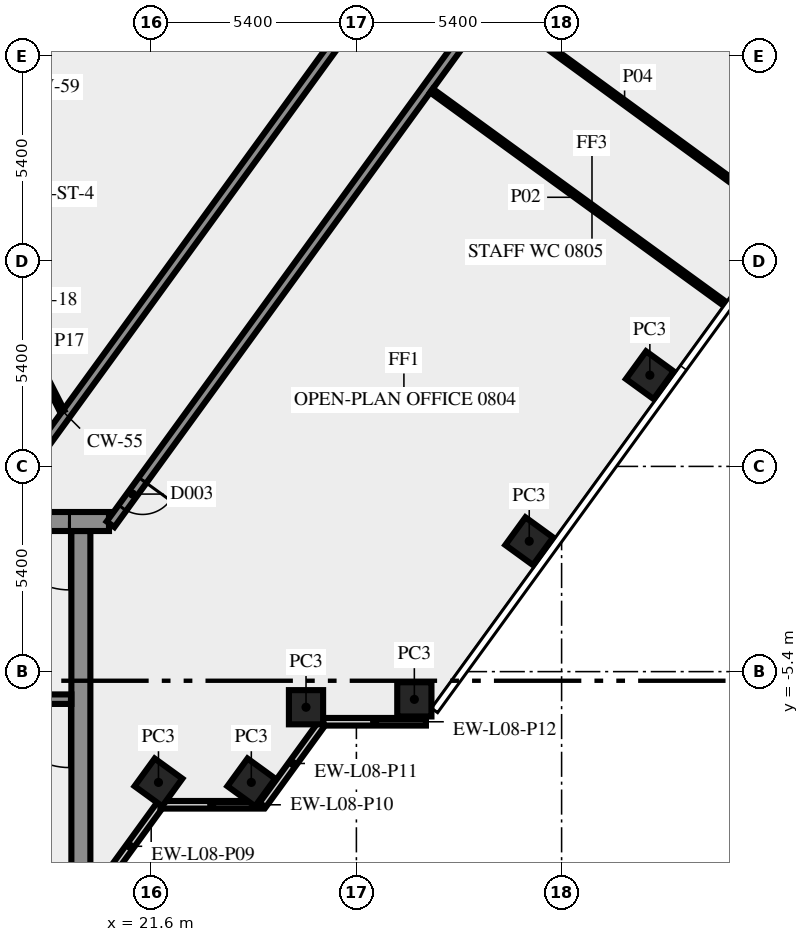
"""IFC4 building model, lengths in metres.
Left out: names, types, materials, properties, quantities, classifications, styles, units other than length and angle.
Written with IfcOpenShell. Run it as: python <this file> out.ifc"""

import sys

from ifc_helpers import new_model, si_unit, direction, frame, frame_2d, origin, origin_2d, place, context, subcontext, project, spatial, rectangle, extrude, element, fill, save


model = new_model("IFC4")
c1 = context("Model", 3, precision=1e-05, world=origin(), true_north=direction((0.0, 1.0)))
c2 = subcontext(c1, "Body", "Model", "MODEL_VIEW")
j1 = project(units=[si_unit("LENGTHUNIT", "METRE"), si_unit("PLANEANGLEUNIT", "RADIAN")], contexts=[c1])
p1 = place(None, origin())
s1 = spatial("IfcSite", under=j1, at=p1, CompositionType="ELEMENT")
p2 = place(p1, origin())
s2 = spatial("IfcBuilding", under=s1, at=p2, CompositionType="ELEMENT")
p3 = place(p2, frame((0.0, 0.0, 39.0)))
s3 = spatial("IfcBuildingStorey", under=s2, at=p3, CompositionType="ELEMENT", Elevation=39.0)
for number, where, z_axis, x_axis in (
    (1, (21.792, -8.315, 0.0), (0.0, 0.0, 1.0), (0.588, 0.809, 0.0)),
    (2, (24.235, -8.315, 0.0), (0.0, 0.0, 1.0), (0.588, 0.809, 0.0)),
    (3, (25.674, -6.337, 0.0), (0.0, 0.0, 1.0), (1.0, 0.0, 0.0)),
    (4, (28.525, -6.13, 0.0), (0.0, 0.0, 1.0), (1.0, 0.0, 0.0)),
    (5, (31.548, -1.969, 0.0), (0.0, 0.0, 1.0), (0.588, 0.809, 0.0)),
    (6, (34.722, 2.4, 0.0), (0.0, 0.0, 1.0), (0.588, 0.809, 0.0)),
):
    element("IfcColumn", number, at=place(p3, frame(where, z_axis=z_axis, x_axis=x_axis)), inside=s3, PredefinedType="COLUMN", context=c2, shape_type="SweptSolid", body=[
        extrude(rectangle(XDim=0.9, YDim=0.9, at=origin_2d()), origin(), (0.0, 0.0, 1.0), 3.65),
    ])
p4 = place(p3, frame((20.253, -11.083, 0.0), z_axis=(0.0, 0.0, 1.0), x_axis=(0.587766567315, 0.809030569476, 0.0)))
e7 = element("IfcWall", 7, at=p4, inside=s3, PredefinedType="SOLIDWALL", context=c2, shape_type="SweptSolid", body=[
    extrude(rectangle(XDim=2.688, YDim=0.2, at=frame_2d((1.344, 0.0))), origin(), (0.0, 0.0, 1.0), 3.65),
])
p5 = place(p3, frame((21.843, -8.904, 0.0), z_axis=(0.0, 0.0, 1.0), x_axis=(1.0, 0.0, 0.0)))
e8 = element("IfcWall", 8, at=p5, inside=s3, PredefinedType="SOLIDWALL", context=c2, shape_type="SweptSolid", body=[
    extrude(rectangle(XDim=2.7, YDim=0.2, at=frame_2d((1.35, 0.0))), origin(), (0.0, 0.0, 1.0), 3.65),
])
p6 = place(p3, frame((24.533, -8.909, 0.0), z_axis=(0.0, 0.0, 1.0), x_axis=(0.587720002413, 0.809064397168, 0.0)))
e9 = element("IfcWall", 9, at=p6, inside=s3, PredefinedType="SOLIDWALL", context=c2, shape_type="SweptSolid", body=[
    extrude(rectangle(XDim=2.7, YDim=0.2, at=frame_2d((1.35, 0.0))), origin(), (0.0, 0.0, 1.0), 3.65),
])
p7 = place(p3, frame((26.13, -6.719, 0.0), z_axis=(0.0, 0.0, 1.0), x_axis=(1.0, 0.0, 0.0)))
e10 = element("IfcWall", 10, at=p7, inside=s3, PredefinedType="SOLIDWALL", context=c2, shape_type="SweptSolid", body=[
    extrude(rectangle(XDim=2.7, YDim=0.2, at=frame_2d((1.35, 0.0))), origin(), (0.0, 0.0, 1.0), 3.65),
])
p8 = place(p3, frame((19.75, -10.5, 0.0), z_axis=(0.0, 0.0, 1.0), x_axis=(0.0, 1.0, 0.0)))
e11 = element("IfcWall", 11, at=p8, inside=s3, PredefinedType="SHEAR", context=c2, shape_type="SweptSolid", body=[
    extrude(rectangle(XDim=8.8, YDim=0.5, at=frame_2d((4.4, 0.0))), origin(), (0.0, 0.0, 1.0), 3.65),
])
p9 = place(p3, frame((19.5, -6.125, 0.0), z_axis=(0.0, 0.0, 1.0), x_axis=(-1.0, 0.0, 0.0)))
e12 = element("IfcWall", 12, at=p9, inside=s3, PredefinedType="SHEAR", context=c2, shape_type="SweptSolid", body=[
    extrude(rectangle(XDim=8.05, YDim=0.25, at=frame_2d((4.025, 0.0))), origin(), (0.0, 0.0, 1.0), 3.65),
])
p10 = place(p9, frame((0.05, 0.0, 0.0)))
e13 = element("IfcOpeningElement", 13, at=p10, cuts=e12, PredefinedType="OPENING", context=c2, shape_type="SweptSolid", body=[
    extrude(rectangle(XDim=1.8, YDim=2.1, at=frame_2d((0.9, 1.05))), frame((0.0, 0.135, 0.0), z_axis=(0.0, -1.0, 0.0), x_axis=(1.0, 0.0, 0.0)), (0.0, 0.0, 1.0), 0.27),
])
p11 = place(p3, frame((20.49, -1.45, 0.0), z_axis=(0.0, 0.0, 1.0), x_axis=(-1.0, 0.0, 0.0)))
e14 = element("IfcWall", 14, at=p11, inside=s3, PredefinedType="SHEAR", context=c2, shape_type="SweptSolid", body=[
    extrude(rectangle(XDim=40.98, YDim=0.5, at=frame_2d((20.49, 0.0))), origin(), (0.0, 0.0, 1.0), 3.65),
])
p12 = place(p11, frame((38.14, 0.0, 0.0)))
e15 = element("IfcOpeningElement", 15, at=p12, cuts=e14, PredefinedType="OPENING", context=c2, shape_type="SweptSolid", body=[
    extrude(rectangle(XDim=1.8, YDim=2.1, at=frame_2d((0.9, 1.05))), frame((0.0, 0.26, 0.0), z_axis=(0.0, -1.0, 0.0), x_axis=(1.0, 0.0, 0.0)), (0.0, 0.0, 1.0), 0.52),
])
p13 = place(p11, frame((36.728, 0.0, 0.0)))
e16 = element("IfcOpeningElement", 16, at=p13, cuts=e14, PredefinedType="OPENING", context=c2, shape_type="SweptSolid", body=[
    extrude(rectangle(XDim=0.8, YDim=2.1, at=frame_2d((0.4, 1.05))), frame((0.0, 0.26, 0.0), z_axis=(0.0, -1.0, 0.0), x_axis=(1.0, 0.0, 0.0)), (0.0, 0.0, 1.0), 0.52),
])
p14 = place(p11, frame((35.153, 0.0, 0.0)))
e17 = element("IfcOpeningElement", 17, at=p14, cuts=e14, PredefinedType="OPENING", context=c2, shape_type="SweptSolid", body=[
    extrude(rectangle(XDim=0.8, YDim=2.1, at=frame_2d((0.4, 1.05))), frame((0.0, 0.26, 0.0), z_axis=(0.0, -1.0, 0.0), x_axis=(1.0, 0.0, 0.0)), (0.0, 0.0, 1.0), 0.52),
])
p15 = place(p11, frame((32.94, 0.0, 0.0)))
e18 = element("IfcOpeningElement", 18, at=p15, cuts=e14, PredefinedType="OPENING", context=c2, shape_type="SweptSolid", body=[
    extrude(rectangle(XDim=0.9, YDim=2.1, at=frame_2d((0.45, 1.05))), frame((0.0, 0.26, 0.0), z_axis=(0.0, -1.0, 0.0), x_axis=(1.0, 0.0, 0.0)), (0.0, 0.0, 1.0), 0.52),
])
p16 = place(p11, frame((21.765, 0.0, 0.0)))
e19 = element("IfcOpeningElement", 19, at=p16, cuts=e14, PredefinedType="OPENING", context=c2, shape_type="SweptSolid", body=[
    extrude(rectangle(XDim=2.0, YDim=2.1, at=frame_2d((1.0, 1.05))), frame((0.0, 0.26, 0.0), z_axis=(0.0, -1.0, 0.0), x_axis=(1.0, 0.0, 0.0)), (0.0, 0.0, 1.0), 0.52),
])
p17 = place(p11, frame((7.14, 0.0, 0.0)))
e20 = element("IfcOpeningElement", 20, at=p17, cuts=e14, PredefinedType="OPENING", context=c2, shape_type="SweptSolid", body=[
    extrude(rectangle(XDim=0.9, YDim=2.1, at=frame_2d((0.45, 1.05))), frame((0.0, 0.26, 0.0), z_axis=(0.0, -1.0, 0.0), x_axis=(1.0, 0.0, 0.0)), (0.0, 0.0, 1.0), 0.52),
])
p18 = place(p11, frame((4.19, 0.0, 0.0)))
e21 = element("IfcOpeningElement", 21, at=p18, cuts=e14, PredefinedType="OPENING", context=c2, shape_type="SweptSolid", body=[
    extrude(rectangle(XDim=0.9, YDim=2.1, at=frame_2d((0.45, 1.05))), frame((0.0, 0.26, 0.0), z_axis=(0.0, -1.0, 0.0), x_axis=(1.0, 0.0, 0.0)), (0.0, 0.0, 1.0), 0.52),
])
p19 = place(p11, frame((1.04, 0.0, 0.0)))
e22 = element("IfcOpeningElement", 22, at=p19, cuts=e14, PredefinedType="OPENING", context=c2, shape_type="SweptSolid", body=[
    extrude(rectangle(XDim=1.8, YDim=2.1, at=frame_2d((0.9, 1.05))), frame((0.0, 0.26, 0.0), z_axis=(0.0, -1.0, 0.0), x_axis=(1.0, 0.0, 0.0)), (0.0, 0.0, 1.0), 0.52),
])
p20 = place(p3, frame((17.545, -1.125, 0.0), z_axis=(0.0, 0.0, 1.0), x_axis=(0.587786323093, 0.809016216391, 0.0)))
e23 = element("IfcWall", 23, at=p20, inside=s3, PredefinedType="SOLIDWALL", context=c2, shape_type="SweptSolid", body=[
    extrude(rectangle(XDim=33.493, YDim=0.25, at=frame_2d((16.747, 0.0))), origin(), (0.0, 0.0, 1.0), 3.65),
])
p21 = place(p20, frame((25.857, 0.0, 0.0)))
e24 = element("IfcOpeningElement", 24, at=p21, cuts=e23, PredefinedType="OPENING", context=c2, shape_type="SweptSolid", body=[
    extrude(rectangle(XDim=0.9, YDim=2.1, at=frame_2d((0.45, 1.05))), frame((0.0, 0.135, 0.0), z_axis=(0.0, -1.0, 0.0), x_axis=(1.0, 0.0, 0.0)), (0.0, 0.0, 1.0), 0.27),
])
p22 = place(p20, frame((24.157, 0.0, 0.0)))
e25 = element("IfcOpeningElement", 25, at=p22, cuts=e23, PredefinedType="OPENING", context=c2, shape_type="SweptSolid", body=[
    extrude(rectangle(XDim=1.0, YDim=2.1, at=frame_2d((0.5, 1.05))), frame((0.0, 0.135, 0.0), z_axis=(0.0, -1.0, 0.0), x_axis=(1.0, 0.0, 0.0)), (0.0, 0.0, 1.0), 0.27),
])
p23 = place(p3, frame((43.467, 30.045, 0.0), z_axis=(0.0, 0.0, 1.0), x_axis=(-0.587784726077, -0.809017376692, 0.0)))
e26 = element("IfcWall", 26, at=p23, inside=s3, PredefinedType="SOLIDWALL", context=c2, shape_type="SweptSolid", body=[
    extrude(rectangle(XDim=39.02, YDim=0.25, at=frame_2d((19.51, 0.0))), origin(), (0.0, 0.0, 1.0), 3.65),
])
p24 = place(p23, frame((37.588, 0.0, 0.0)))
e27 = element("IfcOpeningElement", 27, at=p24, cuts=e26, PredefinedType="OPENING", context=c2, shape_type="SweptSolid", body=[
    extrude(rectangle(XDim=0.9, YDim=2.1, at=frame_2d((0.45, 1.05))), frame((0.0, 0.135, 0.0), z_axis=(0.0, -1.0, 0.0), x_axis=(1.0, 0.0, 0.0)), (0.0, 0.0, 1.0), 0.27),
])
p25 = place(p23, frame((20.855, 0.0, 0.0)))
e28 = element("IfcOpeningElement", 28, at=p25, cuts=e26, PredefinedType="OPENING", context=c2, shape_type="SweptSolid", body=[
    extrude(rectangle(XDim=0.9, YDim=2.1, at=frame_2d((0.45, 1.05))), frame((0.0, 0.135, 0.0), z_axis=(0.0, -1.0, 0.0), x_axis=(1.0, 0.0, 0.0)), (0.0, 0.0, 1.0), 0.27),
])
p26 = place(p23, frame((7.355, 0.0, 0.0)))
e29 = element("IfcOpeningElement", 29, at=p26, cuts=e26, PredefinedType="OPENING", context=c2, shape_type="SweptSolid", body=[
    extrude(rectangle(XDim=0.9, YDim=2.1, at=frame_2d((0.45, 1.05))), frame((0.0, 0.135, 0.0), z_axis=(0.0, -1.0, 0.0), x_axis=(1.0, 0.0, 0.0)), (0.0, 0.0, 1.0), 0.27),
])
p27 = place(p23, frame((11.404, 0.0, 0.0)))
e30 = element("IfcOpeningElement", 30, at=p27, cuts=e26, PredefinedType="OPENING", context=c2, shape_type="SweptSolid", body=[
    extrude(rectangle(XDim=0.9, YDim=2.1, at=frame_2d((0.45, 1.05))), frame((0.0, 0.135, 0.0), z_axis=(0.0, -1.0, 0.0), x_axis=(1.0, 0.0, 0.0)), (0.0, 0.0, 1.0), 0.27),
])
p28 = place(p23, frame((0.604, 0.0, 0.0)))
e31 = element("IfcOpeningElement", 31, at=p28, cuts=e26, PredefinedType="OPENING", context=c2, shape_type="SweptSolid", body=[
    extrude(rectangle(XDim=0.9, YDim=2.1, at=frame_2d((0.45, 1.05))), frame((0.0, 0.135, 0.0), z_axis=(0.0, -1.0, 0.0), x_axis=(1.0, 0.0, 0.0)), (0.0, 0.0, 1.0), 0.27),
])
p29 = place(p23, frame((22.455, 0.0, 0.0)))
e32 = element("IfcOpeningElement", 32, at=p29, cuts=e26, PredefinedType="OPENING", context=c2, shape_type="SweptSolid", body=[
    extrude(rectangle(XDim=0.9, YDim=2.1, at=frame_2d((0.45, 1.05))), frame((0.0, 0.135, 0.0), z_axis=(0.0, -1.0, 0.0), x_axis=(1.0, 0.0, 0.0)), (0.0, 0.0, 1.0), 0.27),
])
p30 = place(p3, frame((36.702, 4.274, 0.0), z_axis=(0.0, 0.0, 1.0), x_axis=(-0.808998008689, 0.58781138296, 0.0)))
e33 = element("IfcWall", 33, at=p30, inside=s3, PredefinedType="PARTITIONING", context=c2, shape_type="SweptSolid", body=[
    extrude(rectangle(XDim=9.55, YDim=0.12, at=frame_2d((4.775, 0.0))), origin(), (0.0, 0.0, 1.0), 2.75),
])
p31 = place(p3, frame((30.587, 12.104, 0.0), z_axis=(0.0, 0.0, 1.0), x_axis=(0.807590933527, -0.589743066161, 0.0)))
e34 = element("IfcWall", 34, at=p31, inside=s3, PredefinedType="PARTITIONING", context=c2, shape_type="SweptSolid", body=[
    extrude(rectangle(XDim=8.594, YDim=0.12, at=frame_2d((4.297, 0.0))), origin(), (0.0, 0.0, 1.0), 3.65),
])
p32 = place(p3, frame((18.0, 3.925, 0.0), z_axis=(0.0, 0.0, 1.0), x_axis=(0.453950796792, -0.891026752736, 0.0)))
e35 = element("IfcWall", 35, at=p32, inside=s3, PredefinedType="PARTITIONING", context=c2, shape_type="SweptSolid", body=[
    extrude(rectangle(XDim=2.778, YDim=0.12, at=frame_2d((1.389, 0.0))), origin(), (0.0, 0.0, 1.0), 3.65),
])
p33 = place(p10, origin())
e36 = element("IfcDoor", 36, at=p33, inside=s3, OperationType="DOUBLE_DOOR_SINGLE_SWING", PredefinedType="DOOR", context=c2, shape_type="SweptSolid", body=[
    extrude(rectangle(XDim=1.8, YDim=2.1, at=frame_2d((0.9, 1.05))), frame((0.0, 0.025, 0.0), z_axis=(0.0, -1.0, 0.0), x_axis=(1.0, 0.0, 0.0)), (0.0, 0.0, 1.0), 0.05),
])
fill(e13, e36)
p34 = place(p19, origin())
e37 = element("IfcDoor", 37, at=p34, inside=s3, OperationType="DOUBLE_DOOR_SINGLE_SWING", PredefinedType="DOOR", context=c2, shape_type="SweptSolid", body=[
    extrude(rectangle(XDim=1.8, YDim=2.1, at=frame_2d((0.9, 1.05))), frame((0.0, 0.025, 0.0), z_axis=(0.0, -1.0, 0.0), x_axis=(1.0, 0.0, 0.0)), (0.0, 0.0, 1.0), 0.05),
])
fill(e22, e37)
p35 = place(p24, origin())
e38 = element("IfcDoor", 38, at=p35, inside=s3, OperationType="SINGLE_SWING_RIGHT", PredefinedType="DOOR", context=c2, shape_type="SweptSolid", body=[
    extrude(rectangle(XDim=0.9, YDim=2.1, at=frame_2d((0.45, 1.05))), frame((0.0, 0.025, 0.0), z_axis=(0.0, -1.0, 0.0), x_axis=(1.0, 0.0, 0.0)), (0.0, 0.0, 1.0), 0.05),
])
fill(e27, e38)
save(model, sys.argv[1])
